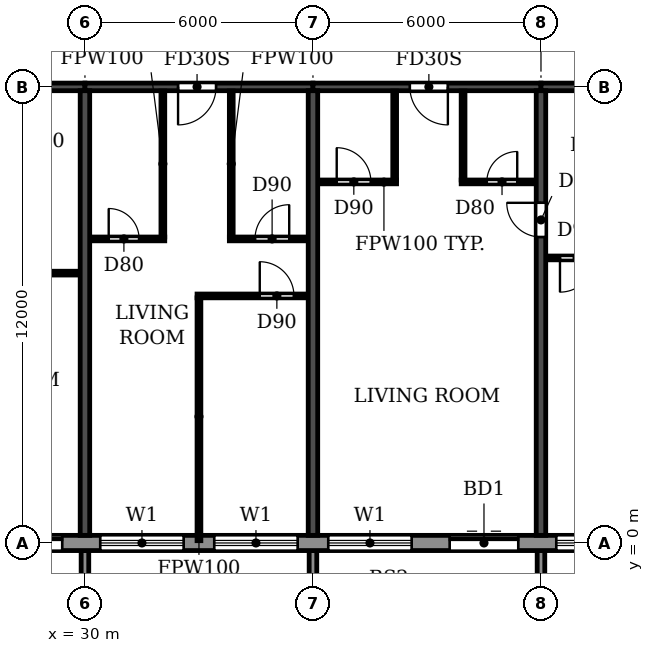
"""IFC4 building model, lengths in metres.
Left out: names, types, materials, properties, quantities, classifications, styles, units other than length and angle.
Written with IfcOpenShell. Run it as: python <this file> out.ifc"""

import sys

from ifc_helpers import new_model, si_unit, direction, frame, frame_2d, origin, place, context, subcontext, project, spatial, polyline, rectangle, outline, extrude, source, transform, mapped, element, fill, save


model = new_model("IFC4")
c1 = context("Model", 3, precision=1e-05, world=origin(), true_north=direction((0.0, 1.0)))
c2 = subcontext(c1, "Body", "Model", "MODEL_VIEW")
j1 = project(units=[si_unit("LENGTHUNIT", "METRE"), si_unit("PLANEANGLEUNIT", "RADIAN")], contexts=[c1])
p1 = place(None, origin())
s1 = spatial("IfcSite", under=j1, at=p1, CompositionType="ELEMENT")
p2 = place(p1, origin())
s2 = spatial("IfcBuilding", under=s1, at=p2, CompositionType="ELEMENT")
p3 = place(p2, frame((0.0, 0.0, 175.2)))
s3 = spatial("IfcBuildingStorey", under=s2, at=p3, CompositionType="ELEMENT", Elevation=175.2)
for number, where, z_axis, x_axis in (
    (1, (30.0, 0.2, 0.0), (0.0, 0.0, 1.0), (0.0, 1.0, 0.0)),
    (2, (36.0, 0.2, 0.0), (0.0, 0.0, 1.0), (0.0, 1.0, 0.0)),
):
    element("IfcWall", number, at=place(p3, frame(where, z_axis=z_axis, x_axis=x_axis)), inside=s3, PredefinedType="SHEAR", context=c2, shape_type="SweptSolid", body=[
        extrude(rectangle(XDim=11.7, YDim=0.25, at=frame_2d((5.85, 0.0))), origin(), (0.0, 0.0, 1.0), 3.08),
    ])
p4 = place(p3, frame((42.0, 0.2, 0.0), z_axis=(0.0, 0.0, 1.0), x_axis=(0.0, 1.0, 0.0)))
e3 = element("IfcWall", 3, at=p4, inside=s3, PredefinedType="SHEAR", context=c2, shape_type="SweptSolid", body=[
    extrude(rectangle(XDim=11.7, YDim=0.25, at=frame_2d((5.85, 0.0))), origin(), (0.0, 0.0, 1.0), 3.08),
])
p5 = place(p4, frame((7.85, 0.0, 0.0)))
e4 = element("IfcOpeningElement", 4, at=p5, cuts=e3, PredefinedType="OPENING", context=c2, shape_type="SweptSolid", body=[
    extrude(rectangle(XDim=0.9, YDim=2.1, at=frame_2d((0.45, 1.05))), frame((0.0, 0.135, 0.0), z_axis=(0.0, -1.0, 0.0), x_axis=(1.0, 0.0, 0.0)), (0.0, 0.0, 1.0), 0.27),
])
p6 = place(p3, frame((24.0, 12.0, 0.0), z_axis=(0.0, 0.0, 1.0), x_axis=(1.0, 0.0, 0.0)))
e5 = element("IfcWall", 5, at=p6, inside=s3, PredefinedType="SHEAR", context=c2, shape_type="SweptSolid", body=[
    extrude(rectangle(XDim=6.0, YDim=0.2, at=frame_2d((3.0, 0.0))), origin(), (0.0, 0.0, 1.0), 2.48),
])
p7 = place(p6, frame((2.55, 0.0, 0.0)))
e6 = element("IfcOpeningElement", 6, at=p7, cuts=e5, PredefinedType="OPENING", context=c2, shape_type="SweptSolid", body=[
    extrude(rectangle(XDim=1.0, YDim=2.1, at=frame_2d((0.5, 1.05))), frame((0.0, 0.11, 0.0), z_axis=(0.0, -1.0, 0.0), x_axis=(1.0, 0.0, 0.0)), (0.0, 0.0, 1.0), 0.22),
])
p8 = place(p3, frame((30.0, 12.0, 0.0), z_axis=(0.0, 0.0, 1.0), x_axis=(1.0, 0.0, 0.0)))
e7 = element("IfcWall", 7, at=p8, inside=s3, PredefinedType="SHEAR", context=c2, shape_type="SweptSolid", body=[
    extrude(rectangle(XDim=6.0, YDim=0.2, at=frame_2d((3.0, 0.0))), origin(), (0.0, 0.0, 1.0), 2.48),
])
p9 = place(p8, frame((2.45, 0.0, 0.0)))
e8 = element("IfcOpeningElement", 8, at=p9, cuts=e7, PredefinedType="OPENING", context=c2, shape_type="SweptSolid", body=[
    extrude(rectangle(XDim=1.0, YDim=2.1, at=frame_2d((0.5, 1.05))), frame((0.0, 0.11, 0.0), z_axis=(0.0, -1.0, 0.0), x_axis=(1.0, 0.0, 0.0)), (0.0, 0.0, 1.0), 0.22),
])
p10 = place(p3, frame((36.0, 12.0, 0.0), z_axis=(0.0, 0.0, 1.0), x_axis=(1.0, 0.0, 0.0)))
e9 = element("IfcWall", 9, at=p10, inside=s3, PredefinedType="SHEAR", context=c2, shape_type="SweptSolid", body=[
    extrude(rectangle(XDim=6.0, YDim=0.2, at=frame_2d((3.0, 0.0))), origin(), (0.0, 0.0, 1.0), 2.48),
])
p11 = place(p10, frame((2.55, 0.0, 0.0)))
e10 = element("IfcOpeningElement", 10, at=p11, cuts=e9, PredefinedType="OPENING", context=c2, shape_type="SweptSolid", body=[
    extrude(rectangle(XDim=1.0, YDim=2.1, at=frame_2d((0.5, 1.05))), frame((0.0, 0.11, 0.0), z_axis=(0.0, -1.0, 0.0), x_axis=(1.0, 0.0, 0.0)), (0.0, 0.0, 1.0), 0.22),
])
p12 = place(p3, frame((42.0, 12.0, 0.0), z_axis=(0.0, 0.0, 1.0), x_axis=(1.0, 0.0, 0.0)))
e11 = element("IfcWall", 11, at=p12, inside=s3, PredefinedType="SHEAR", context=c2, shape_type="SweptSolid", body=[
    extrude(rectangle(XDim=6.0, YDim=0.2, at=frame_2d((3.0, 0.0))), origin(), (0.0, 0.0, 1.0), 2.48),
])
p13 = place(p3, frame((22.683, 0.0, 0.0), z_axis=(0.0, 0.0, 1.0), x_axis=(1.0, 0.0, 0.0)))
e12 = element("IfcWall", 12, at=p13, inside=s3, PredefinedType="STANDARD", context=c2, shape_type="SweptSolid", body=[
    extrude(rectangle(XDim=56.634, YDim=0.4, at=frame_2d((28.317, 0.0))), origin(), (0.0, 0.0, 1.0), 3.08),
])
p14 = place(p13, frame((1.717, 0.0, 0.9)))
e13 = element("IfcOpeningElement", 13, at=p14, cuts=e12, PredefinedType="OPENING", context=c2, shape_type="SweptSolid", body=[
    extrude(rectangle(XDim=2.2, YDim=1.5, at=frame_2d((1.1, 0.75))), frame((0.0, 0.21, 0.0), z_axis=(0.0, -1.0, 0.0), x_axis=(1.0, 0.0, 0.0)), (0.0, 0.0, 1.0), 0.42),
])
p15 = place(p13, frame((4.917, 0.0, 0.0)))
e14 = element("IfcOpeningElement", 14, at=p15, cuts=e12, PredefinedType="OPENING", context=c2, shape_type="SweptSolid", body=[
    extrude(rectangle(XDim=1.8, YDim=2.4, at=frame_2d((0.9, 1.2))), frame((0.0, 0.21, 0.0), z_axis=(0.0, -1.0, 0.0), x_axis=(1.0, 0.0, 0.0)), (0.0, 0.0, 1.0), 0.42),
])
p16 = place(p13, frame((7.717, 0.0, 0.9)))
e15 = element("IfcOpeningElement", 15, at=p16, cuts=e12, PredefinedType="OPENING", context=c2, shape_type="SweptSolid", body=[
    extrude(rectangle(XDim=2.2, YDim=1.5, at=frame_2d((1.1, 0.75))), frame((0.0, 0.21, 0.0), z_axis=(0.0, -1.0, 0.0), x_axis=(1.0, 0.0, 0.0)), (0.0, 0.0, 1.0), 0.42),
])
p17 = place(p13, frame((10.717, 0.0, 0.9)))
e16 = element("IfcOpeningElement", 16, at=p17, cuts=e12, PredefinedType="OPENING", context=c2, shape_type="SweptSolid", body=[
    extrude(rectangle(XDim=2.2, YDim=1.5, at=frame_2d((1.1, 0.75))), frame((0.0, 0.21, 0.0), z_axis=(0.0, -1.0, 0.0), x_axis=(1.0, 0.0, 0.0)), (0.0, 0.0, 1.0), 0.42),
])
p18 = place(p13, frame((13.717, 0.0, 0.9)))
e17 = element("IfcOpeningElement", 17, at=p18, cuts=e12, PredefinedType="OPENING", context=c2, shape_type="SweptSolid", body=[
    extrude(rectangle(XDim=2.2, YDim=1.5, at=frame_2d((1.1, 0.75))), frame((0.0, 0.21, 0.0), z_axis=(0.0, -1.0, 0.0), x_axis=(1.0, 0.0, 0.0)), (0.0, 0.0, 1.0), 0.42),
])
p19 = place(p13, frame((16.917, 0.0, 0.0)))
e18 = element("IfcOpeningElement", 18, at=p19, cuts=e12, PredefinedType="OPENING", context=c2, shape_type="SweptSolid", body=[
    extrude(rectangle(XDim=1.8, YDim=2.4, at=frame_2d((0.9, 1.2))), frame((0.0, 0.21, 0.0), z_axis=(0.0, -1.0, 0.0), x_axis=(1.0, 0.0, 0.0)), (0.0, 0.0, 1.0), 0.42),
])
p20 = place(p13, frame((19.717, 0.0, 0.9)))
e19 = element("IfcOpeningElement", 19, at=p20, cuts=e12, PredefinedType="OPENING", context=c2, shape_type="SweptSolid", body=[
    extrude(rectangle(XDim=2.2, YDim=1.5, at=frame_2d((1.1, 0.75))), frame((0.0, 0.21, 0.0), z_axis=(0.0, -1.0, 0.0), x_axis=(1.0, 0.0, 0.0)), (0.0, 0.0, 1.0), 0.42),
])
p21 = place(p13, frame((22.717, 0.0, 0.9)))
e20 = element("IfcOpeningElement", 20, at=p21, cuts=e12, PredefinedType="OPENING", context=c2, shape_type="SweptSolid", body=[
    extrude(rectangle(XDim=2.2, YDim=1.5, at=frame_2d((1.1, 0.75))), frame((0.0, 0.21, 0.0), z_axis=(0.0, -1.0, 0.0), x_axis=(1.0, 0.0, 0.0)), (0.0, 0.0, 1.0), 0.42),
])
p22 = place(p13, frame((25.917, 0.0, 0.0)))
e21 = element("IfcOpeningElement", 21, at=p22, cuts=e12, PredefinedType="OPENING", context=c2, shape_type="SweptSolid", body=[
    extrude(rectangle(XDim=1.8, YDim=2.4, at=frame_2d((0.9, 1.2))), frame((0.0, 0.21, 0.0), z_axis=(0.0, -1.0, 0.0), x_axis=(1.0, 0.0, 0.0)), (0.0, 0.0, 1.0), 0.42),
])
p23 = place(p13, frame((28.717, 0.0, 0.9)))
e22 = element("IfcOpeningElement", 22, at=p23, cuts=e12, PredefinedType="OPENING", context=c2, shape_type="SweptSolid", body=[
    extrude(rectangle(XDim=2.2, YDim=1.5, at=frame_2d((1.1, 0.75))), frame((0.0, 0.21, 0.0), z_axis=(0.0, -1.0, 0.0), x_axis=(1.0, 0.0, 0.0)), (0.0, 0.0, 1.0), 0.42),
])
p24 = place(p13, frame((31.717, 0.0, 0.9)))
e23 = element("IfcOpeningElement", 23, at=p24, cuts=e12, PredefinedType="OPENING", context=c2, shape_type="SweptSolid", body=[
    extrude(rectangle(XDim=2.2, YDim=1.5, at=frame_2d((1.1, 0.75))), frame((0.0, 0.21, 0.0), z_axis=(0.0, -1.0, 0.0), x_axis=(1.0, 0.0, 0.0)), (0.0, 0.0, 1.0), 0.42),
])
p25 = place(p13, frame((34.717, 0.0, 0.9)))
e24 = element("IfcOpeningElement", 24, at=p25, cuts=e12, PredefinedType="OPENING", context=c2, shape_type="SweptSolid", body=[
    extrude(rectangle(XDim=2.2, YDim=1.5, at=frame_2d((1.1, 0.75))), frame((0.0, 0.21, 0.0), z_axis=(0.0, -1.0, 0.0), x_axis=(1.0, 0.0, 0.0)), (0.0, 0.0, 1.0), 0.42),
])
p26 = place(p13, frame((37.717, 0.0, 0.9)))
e25 = element("IfcOpeningElement", 25, at=p26, cuts=e12, PredefinedType="OPENING", context=c2, shape_type="SweptSolid", body=[
    extrude(rectangle(XDim=2.2, YDim=1.5, at=frame_2d((1.1, 0.75))), frame((0.0, 0.21, 0.0), z_axis=(0.0, -1.0, 0.0), x_axis=(1.0, 0.0, 0.0)), (0.0, 0.0, 1.0), 0.42),
])
p27 = place(p13, frame((40.917, 0.0, 0.0)))
e26 = element("IfcOpeningElement", 26, at=p27, cuts=e12, PredefinedType="OPENING", context=c2, shape_type="SweptSolid", body=[
    extrude(rectangle(XDim=1.8, YDim=2.4, at=frame_2d((0.9, 1.2))), frame((0.0, 0.21, 0.0), z_axis=(0.0, -1.0, 0.0), x_axis=(1.0, 0.0, 0.0)), (0.0, 0.0, 1.0), 0.42),
])
p28 = place(p13, frame((43.717, 0.0, 0.9)))
e27 = element("IfcOpeningElement", 27, at=p28, cuts=e12, PredefinedType="OPENING", context=c2, shape_type="SweptSolid", body=[
    extrude(rectangle(XDim=2.2, YDim=1.5, at=frame_2d((1.1, 0.75))), frame((0.0, 0.21, 0.0), z_axis=(0.0, -1.0, 0.0), x_axis=(1.0, 0.0, 0.0)), (0.0, 0.0, 1.0), 0.42),
])
p29 = place(p13, frame((46.717, 0.0, 0.9)))
e28 = element("IfcOpeningElement", 28, at=p29, cuts=e12, PredefinedType="OPENING", context=c2, shape_type="SweptSolid", body=[
    extrude(rectangle(XDim=2.2, YDim=1.5, at=frame_2d((1.1, 0.75))), frame((0.0, 0.21, 0.0), z_axis=(0.0, -1.0, 0.0), x_axis=(1.0, 0.0, 0.0)), (0.0, 0.0, 1.0), 0.42),
])
p30 = place(p13, frame((49.717, 0.0, 0.9)))
e29 = element("IfcOpeningElement", 29, at=p30, cuts=e12, PredefinedType="OPENING", context=c2, shape_type="SweptSolid", body=[
    extrude(rectangle(XDim=2.2, YDim=1.5, at=frame_2d((1.1, 0.75))), frame((0.0, 0.21, 0.0), z_axis=(0.0, -1.0, 0.0), x_axis=(1.0, 0.0, 0.0)), (0.0, 0.0, 1.0), 0.42),
])
p31 = place(p13, frame((52.917, 0.0, 0.0)))
e30 = element("IfcOpeningElement", 30, at=p31, cuts=e12, PredefinedType="OPENING", context=c2, shape_type="SweptSolid", body=[
    extrude(rectangle(XDim=1.8, YDim=2.4, at=frame_2d((0.9, 1.2))), frame((0.0, 0.21, 0.0), z_axis=(0.0, -1.0, 0.0), x_axis=(1.0, 0.0, 0.0)), (0.0, 0.0, 1.0), 0.42),
])
m1 = source(origin(), c2, "Body", "SweptSolid", [
    extrude(outline(polyline([(0.0, 0.0), (0.2, 0.0), (0.2, 1.65), (0.0, 1.65), (0.0, 0.0)])), origin(), (0.0, 0.0, 1.0), 3.1),
])
for number, where in (
    (31, (29.9, -1.85, 0.0)),
    (32, (35.9, -1.85, 0.0)),
    (33, (41.9, -1.85, 0.0)),
):
    element("IfcWall", number, at=place(p3, frame(where)), inside=s3, PredefinedType="STANDARD", context=c2, shape_type="MappedRepresentation", body=[
        mapped(m1, transform((0.0, 0.0, 0.0))),
    ])
p32 = place(p3, frame((32.95, 6.5, 0.0), z_axis=(0.0, 0.0, 1.0), x_axis=(1.0, 0.0, 0.0)))
e34 = element("IfcWall", 34, at=p32, inside=s3, PredefinedType="PARTITIONING", context=c2, shape_type="SweptSolid", body=[
    extrude(rectangle(XDim=2.915, YDim=0.1, at=frame_2d((1.458, 0.0))), origin(), (0.0, 0.0, 1.0), 3.08),
])
p33 = place(p32, frame((1.65, 0.0, 0.0)))
e35 = element("IfcOpeningElement", 35, at=p33, cuts=e34, PredefinedType="OPENING", context=c2, shape_type="SweptSolid", body=[
    extrude(rectangle(XDim=0.9, YDim=2.1, at=frame_2d((0.45, 1.05))), frame((0.0, 0.06, 0.0), z_axis=(0.0, -1.0, 0.0), x_axis=(1.0, 0.0, 0.0)), (0.0, 0.0, 1.0), 0.12),
])
p34 = place(p3, frame((27.9, 7.1, 0.0), z_axis=(0.0, 0.0, 1.0), x_axis=(1.0, 0.0, 0.0)))
e36 = element("IfcWall", 36, at=p34, inside=s3, PredefinedType="PARTITIONING", context=c2, shape_type="SweptSolid", body=[
    extrude(rectangle(XDim=1.965, YDim=0.1, at=frame_2d((0.982, 0.0))), origin(), (0.0, 0.0, 1.0), 3.08),
])
p35 = place(p3, frame((42.135, 7.5, 0.0), z_axis=(0.0, 0.0, 1.0), x_axis=(1.0, 0.0, 0.0)))
e37 = element("IfcWall", 37, at=p35, inside=s3, PredefinedType="PARTITIONING", context=c2, shape_type="SweptSolid", body=[
    extrude(rectangle(XDim=2.765, YDim=0.1, at=frame_2d((1.382, 0.0))), origin(), (0.0, 0.0, 1.0), 3.08),
])
p36 = place(p35, frame((0.365, 0.0, 0.0)))
e38 = element("IfcOpeningElement", 38, at=p36, cuts=e37, PredefinedType="OPENING", context=c2, shape_type="SweptSolid", body=[
    extrude(rectangle(XDim=0.9, YDim=2.1, at=frame_2d((0.45, 1.05))), frame((0.0, 0.06, 0.0), z_axis=(0.0, -1.0, 0.0), x_axis=(1.0, 0.0, 0.0)), (0.0, 0.0, 1.0), 0.12),
])
p37 = place(p3, frame((30.135, 8.0, 0.0), z_axis=(0.0, 0.0, 1.0), x_axis=(1.0, 0.0, 0.0)))
e39 = element("IfcWall", 39, at=p37, inside=s3, PredefinedType="PARTITIONING", context=c2, shape_type="SweptSolid", body=[
    extrude(rectangle(XDim=1.965, YDim=0.1, at=frame_2d((0.982, 0.0))), origin(), (0.0, 0.0, 1.0), 3.08),
])
p38 = place(p37, frame((0.49, 0.0, 0.0)))
e40 = element("IfcOpeningElement", 40, at=p38, cuts=e39, PredefinedType="OPENING", context=c2, shape_type="SweptSolid", body=[
    extrude(rectangle(XDim=0.8, YDim=2.1, at=frame_2d((0.4, 1.05))), frame((0.0, 0.06, 0.0), z_axis=(0.0, -1.0, 0.0), x_axis=(1.0, 0.0, 0.0)), (0.0, 0.0, 1.0), 0.12),
])
p39 = place(p3, frame((33.8, 8.0, 0.0), z_axis=(0.0, 0.0, 1.0), x_axis=(1.0, 0.0, 0.0)))
e41 = element("IfcWall", 41, at=p39, inside=s3, PredefinedType="PARTITIONING", context=c2, shape_type="SweptSolid", body=[
    extrude(rectangle(XDim=2.065, YDim=0.1, at=frame_2d((1.032, 0.0))), origin(), (0.0, 0.0, 1.0), 3.08),
])
p40 = place(p39, frame((0.675, 0.0, 0.0)))
e42 = element("IfcOpeningElement", 42, at=p40, cuts=e41, PredefinedType="OPENING", context=c2, shape_type="SweptSolid", body=[
    extrude(rectangle(XDim=0.9, YDim=2.1, at=frame_2d((0.45, 1.05))), frame((0.0, 0.06, 0.0), z_axis=(0.0, -1.0, 0.0), x_axis=(1.0, 0.0, 0.0)), (0.0, 0.0, 1.0), 0.12),
])
p41 = place(p3, frame((36.135, 9.5, 0.0), z_axis=(0.0, 0.0, 1.0), x_axis=(1.0, 0.0, 0.0)))
e43 = element("IfcWall", 43, at=p41, inside=s3, PredefinedType="PARTITIONING", context=c2, shape_type="SweptSolid", body=[
    extrude(rectangle(XDim=2.065, YDim=0.1, at=frame_2d((1.032, 0.0))), origin(), (0.0, 0.0, 1.0), 3.08),
])
p42 = place(p41, frame((0.49, 0.0, 0.0)))
e44 = element("IfcOpeningElement", 44, at=p42, cuts=e43, PredefinedType="OPENING", context=c2, shape_type="SweptSolid", body=[
    extrude(rectangle(XDim=0.9, YDim=2.1, at=frame_2d((0.45, 1.05))), frame((0.0, 0.06, 0.0), z_axis=(0.0, -1.0, 0.0), x_axis=(1.0, 0.0, 0.0)), (0.0, 0.0, 1.0), 0.12),
])
p43 = place(p3, frame((39.9, 9.5, 0.0), z_axis=(0.0, 0.0, 1.0), x_axis=(1.0, 0.0, 0.0)))
e45 = element("IfcWall", 45, at=p43, inside=s3, PredefinedType="PARTITIONING", context=c2, shape_type="SweptSolid", body=[
    extrude(rectangle(XDim=1.965, YDim=0.1, at=frame_2d((0.982, 0.0))), origin(), (0.0, 0.0, 1.0), 3.08),
])
p44 = place(p43, frame((0.675, 0.0, 0.0)))
e46 = element("IfcOpeningElement", 46, at=p44, cuts=e45, PredefinedType="OPENING", context=c2, shape_type="SweptSolid", body=[
    extrude(rectangle(XDim=0.8, YDim=2.1, at=frame_2d((0.4, 1.05))), frame((0.0, 0.06, 0.0), z_axis=(0.0, -1.0, 0.0), x_axis=(1.0, 0.0, 0.0)), (0.0, 0.0, 1.0), 0.12),
])
p45 = place(p3, frame((32.05, 8.05, 0.0), z_axis=(0.0, 0.0, 1.0), x_axis=(0.0, 1.0, 0.0)))
e47 = element("IfcWall", 47, at=p45, inside=s3, PredefinedType="PARTITIONING", context=c2, shape_type="SweptSolid", body=[
    extrude(rectangle(XDim=3.84, YDim=0.1, at=frame_2d((1.92, 0.0))), origin(), (0.0, 0.0, 1.0), 3.08),
])
p46 = place(p3, frame((33.0, 0.06, 0.0), z_axis=(0.0, 0.0, 1.0), x_axis=(0.0, 1.0, 0.0)))
e48 = element("IfcWall", 48, at=p46, inside=s3, PredefinedType="PARTITIONING", context=c2, shape_type="SweptSolid", body=[
    extrude(rectangle(XDim=6.39, YDim=0.1, at=frame_2d((3.195, 0.0))), origin(), (0.0, 0.0, 1.0), 3.08),
])
p47 = place(p3, frame((33.85, 8.05, 0.0), z_axis=(0.0, 0.0, 1.0), x_axis=(0.0, 1.0, 0.0)))
e49 = element("IfcWall", 49, at=p47, inside=s3, PredefinedType="PARTITIONING", context=c2, shape_type="SweptSolid", body=[
    extrude(rectangle(XDim=3.84, YDim=0.1, at=frame_2d((1.92, 0.0))), origin(), (0.0, 0.0, 1.0), 3.08),
])
for number, where, z_axis, x_axis in (
    (50, (38.15, 9.55, 0.0), (0.0, 0.0, 1.0), (0.0, 1.0, 0.0)),
    (51, (39.95, 9.55, 0.0), (0.0, 0.0, 1.0), (0.0, 1.0, 0.0)),
):
    element("IfcWall", number, at=place(p3, frame(where, z_axis=z_axis, x_axis=x_axis)), inside=s3, PredefinedType="PARTITIONING", context=c2, shape_type="SweptSolid", body=[
        extrude(rectangle(XDim=2.34, YDim=0.1, at=frame_2d((1.17, 0.0))), origin(), (0.0, 0.0, 1.0), 3.08),
    ])
p48 = place(p15, origin())
e52 = element("IfcDoor", 52, at=p48, inside=s3, OperationType="DOUBLE_DOOR_SLIDING", PredefinedType="DOOR", context=c2, shape_type="SweptSolid", body=[
    extrude(rectangle(XDim=1.8, YDim=2.4, at=frame_2d((0.9, 1.2))), frame((0.0, 0.025, 0.0), z_axis=(0.0, -1.0, 0.0), x_axis=(1.0, 0.0, 0.0)), (0.0, 0.0, 1.0), 0.05),
])
fill(e14, e52)
p49 = place(p16, origin())
e53 = element("IfcWindow", 53, at=p49, inside=s3, PartitioningType="DOUBLE_PANEL_HORIZONTAL", PredefinedType="WINDOW", context=c2, shape_type="SweptSolid", body=[
    extrude(rectangle(XDim=2.2, YDim=1.5, at=frame_2d((1.1, 0.75))), frame((0.0, 0.03, 0.0), z_axis=(0.0, -1.0, 0.0), x_axis=(1.0, 0.0, 0.0)), (0.0, 0.0, 1.0), 0.06),
])
fill(e15, e53)
p50 = place(p17, origin())
e54 = element("IfcWindow", 54, at=p50, inside=s3, PartitioningType="DOUBLE_PANEL_HORIZONTAL", PredefinedType="WINDOW", context=c2, shape_type="SweptSolid", body=[
    extrude(rectangle(XDim=2.2, YDim=1.5, at=frame_2d((1.1, 0.75))), frame((0.0, 0.03, 0.0), z_axis=(0.0, -1.0, 0.0), x_axis=(1.0, 0.0, 0.0)), (0.0, 0.0, 1.0), 0.06),
])
fill(e16, e54)
p51 = place(p18, origin())
e55 = element("IfcWindow", 55, at=p51, inside=s3, PartitioningType="DOUBLE_PANEL_HORIZONTAL", PredefinedType="WINDOW", context=c2, shape_type="SweptSolid", body=[
    extrude(rectangle(XDim=2.2, YDim=1.5, at=frame_2d((1.1, 0.75))), frame((0.0, 0.03, 0.0), z_axis=(0.0, -1.0, 0.0), x_axis=(1.0, 0.0, 0.0)), (0.0, 0.0, 1.0), 0.06),
])
fill(e17, e55)
p52 = place(p19, origin())
e56 = element("IfcDoor", 56, at=p52, inside=s3, OperationType="DOUBLE_DOOR_SLIDING", PredefinedType="DOOR", context=c2, shape_type="SweptSolid", body=[
    extrude(rectangle(XDim=1.8, YDim=2.4, at=frame_2d((0.9, 1.2))), frame((0.0, 0.025, 0.0), z_axis=(0.0, -1.0, 0.0), x_axis=(1.0, 0.0, 0.0)), (0.0, 0.0, 1.0), 0.05),
])
fill(e18, e56)
p53 = place(p20, origin())
e57 = element("IfcWindow", 57, at=p53, inside=s3, PartitioningType="DOUBLE_PANEL_HORIZONTAL", PredefinedType="WINDOW", context=c2, shape_type="SweptSolid", body=[
    extrude(rectangle(XDim=2.2, YDim=1.5, at=frame_2d((1.1, 0.75))), frame((0.0, 0.03, 0.0), z_axis=(0.0, -1.0, 0.0), x_axis=(1.0, 0.0, 0.0)), (0.0, 0.0, 1.0), 0.06),
])
fill(e19, e57)
p54 = place(p38, origin())
e58 = element("IfcDoor", 58, at=p54, inside=s3, OperationType="SINGLE_SWING_LEFT", PredefinedType="DOOR", context=c2, shape_type="SweptSolid", body=[
    extrude(rectangle(XDim=0.8, YDim=2.1, at=frame_2d((0.4, 1.05))), frame((0.0, 0.025, 0.0), z_axis=(0.0, -1.0, 0.0), x_axis=(1.0, 0.0, 0.0)), (0.0, 0.0, 1.0), 0.05),
])
fill(e40, e58)
p55 = place(p9, frame((1.0, 0.0, 0.0), z_axis=(0.0, 0.0, 1.0), x_axis=(-1.0, 0.0, 0.0)))
e59 = element("IfcDoor", 59, at=p55, inside=s3, OperationType="SINGLE_SWING_RIGHT", PredefinedType="DOOR", context=c2, shape_type="SweptSolid", body=[
    extrude(rectangle(XDim=1.0, YDim=2.1, at=frame_2d((0.5, 1.05))), frame((0.0, 0.025, 0.0), z_axis=(0.0, -1.0, 0.0), x_axis=(1.0, 0.0, 0.0)), (0.0, 0.0, 1.0), 0.05),
])
fill(e8, e59)
p56 = place(p40, origin())
e60 = element("IfcDoor", 60, at=p56, inside=s3, OperationType="SINGLE_SWING_RIGHT", PredefinedType="DOOR", context=c2, shape_type="SweptSolid", body=[
    extrude(rectangle(XDim=0.9, YDim=2.1, at=frame_2d((0.45, 1.05))), frame((0.0, 0.025, 0.0), z_axis=(0.0, -1.0, 0.0), x_axis=(1.0, 0.0, 0.0)), (0.0, 0.0, 1.0), 0.05),
])
fill(e42, e60)
p57 = place(p33, origin())
e61 = element("IfcDoor", 61, at=p57, inside=s3, OperationType="SINGLE_SWING_LEFT", PredefinedType="DOOR", context=c2, shape_type="SweptSolid", body=[
    extrude(rectangle(XDim=0.9, YDim=2.1, at=frame_2d((0.45, 1.05))), frame((0.0, 0.025, 0.0), z_axis=(0.0, -1.0, 0.0), x_axis=(1.0, 0.0, 0.0)), (0.0, 0.0, 1.0), 0.05),
])
fill(e35, e61)
p58 = place(p36, frame((0.9, 0.0, 0.0), z_axis=(0.0, 0.0, 1.0), x_axis=(-1.0, 0.0, 0.0)))
e62 = element("IfcDoor", 62, at=p58, inside=s3, OperationType="SINGLE_SWING_RIGHT", PredefinedType="DOOR", context=c2, shape_type="SweptSolid", body=[
    extrude(rectangle(XDim=0.9, YDim=2.1, at=frame_2d((0.45, 1.05))), frame((0.0, 0.025, 0.0), z_axis=(0.0, -1.0, 0.0), x_axis=(1.0, 0.0, 0.0)), (0.0, 0.0, 1.0), 0.05),
])
fill(e38, e62)
p59 = place(p42, origin())
e63 = element("IfcDoor", 63, at=p59, inside=s3, OperationType="SINGLE_SWING_LEFT", PredefinedType="DOOR", context=c2, shape_type="SweptSolid", body=[
    extrude(rectangle(XDim=0.9, YDim=2.1, at=frame_2d((0.45, 1.05))), frame((0.0, 0.025, 0.0), z_axis=(0.0, -1.0, 0.0), x_axis=(1.0, 0.0, 0.0)), (0.0, 0.0, 1.0), 0.05),
])
fill(e44, e63)
p60 = place(p11, frame((1.0, 0.0, 0.0), z_axis=(0.0, 0.0, 1.0), x_axis=(-1.0, 0.0, 0.0)))
e64 = element("IfcDoor", 64, at=p60, inside=s3, OperationType="SINGLE_SWING_LEFT", PredefinedType="DOOR", context=c2, shape_type="SweptSolid", body=[
    extrude(rectangle(XDim=1.0, YDim=2.1, at=frame_2d((0.5, 1.05))), frame((0.0, 0.025, 0.0), z_axis=(0.0, -1.0, 0.0), x_axis=(1.0, 0.0, 0.0)), (0.0, 0.0, 1.0), 0.05),
])
fill(e10, e64)
p61 = place(p44, origin())
e65 = element("IfcDoor", 65, at=p61, inside=s3, OperationType="SINGLE_SWING_RIGHT", PredefinedType="DOOR", context=c2, shape_type="SweptSolid", body=[
    extrude(rectangle(XDim=0.8, YDim=2.1, at=frame_2d((0.4, 1.05))), frame((0.0, 0.025, 0.0), z_axis=(0.0, -1.0, 0.0), x_axis=(1.0, 0.0, 0.0)), (0.0, 0.0, 1.0), 0.05),
])
fill(e46, e65)
p62 = place(p5, origin())
e66 = element("IfcDoor", 66, at=p62, inside=s3, OperationType="SINGLE_SWING_RIGHT", PredefinedType="DOOR", context=c2, shape_type="SweptSolid", body=[
    extrude(rectangle(XDim=0.9, YDim=2.1, at=frame_2d((0.45, 1.05))), frame((0.0, 0.025, 0.0), z_axis=(0.0, -1.0, 0.0), x_axis=(1.0, 0.0, 0.0)), (0.0, 0.0, 1.0), 0.05),
])
fill(e4, e66)
save(model, sys.argv[1])
